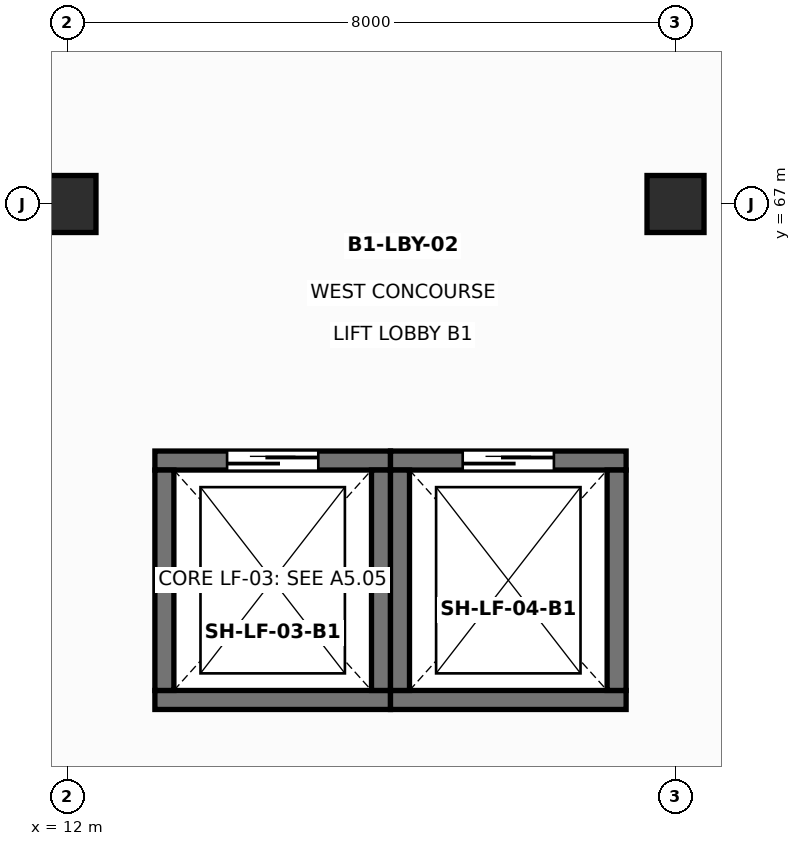
"""IFC4 building model, lengths in metres.
Left out: names, types, materials, properties, quantities, classifications, styles, units other than length and angle.
Written with IfcOpenShell. Run it as: python <this file> out.ifc"""

import sys

from ifc_helpers import new_model, si_unit, direction, frame, frame_2d, origin, origin_2d, place, context, subcontext, project, spatial, rectangle, extrude, element, fill, save


model = new_model("IFC4")
c1 = context("Model", 3, precision=1e-05, world=origin(), true_north=direction((0.0, 1.0)))
c2 = subcontext(c1, "Body", "Model", "MODEL_VIEW")
j1 = project(units=[si_unit("LENGTHUNIT", "METRE"), si_unit("PLANEANGLEUNIT", "RADIAN")], contexts=[c1])
p1 = place(None, origin())
s1 = spatial("IfcSite", under=j1, at=p1, CompositionType="ELEMENT")
p2 = place(p1, origin())
s2 = spatial("IfcBuilding", under=s1, at=p2, CompositionType="ELEMENT")
p3 = place(p2, frame((0.0, 0.0, -5.6)))
s3 = spatial("IfcBuildingStorey", under=s2, at=p3, CompositionType="ELEMENT", Elevation=-5.6)
for number, where, z_axis, x_axis in (
    (1, (12.0, 67.0, 0.0), (0.0, 0.0, 1.0), (1.0, 0.0, 0.0)),
    (2, (20.0, 67.0, 0.0), (0.0, 0.0, 1.0), (1.0, 0.0, 0.0)),
):
    element("IfcColumn", number, at=place(p3, frame(where, z_axis=z_axis, x_axis=x_axis)), inside=s3, PredefinedType="COLUMN", context=c2, shape_type="SweptSolid", body=[
        extrude(rectangle(XDim=0.75, YDim=0.75, at=origin_2d()), origin(), (0.0, 0.0, 1.0), 5.6),
    ])
p4 = place(p3, frame((13.15, 60.475, 0.0), z_axis=(0.0, 0.0, 1.0), x_axis=(1.0, 0.0, 0.0)))
e3 = element("IfcWall", 3, at=p4, inside=s3, PredefinedType="SOLIDWALL", context=c2, shape_type="SweptSolid", body=[
    extrude(rectangle(XDim=3.1, YDim=0.25, at=frame_2d((1.55, 0.0))), origin(), (0.0, 0.0, 1.0), 5.275),
])
p5 = place(p3, frame((16.25, 63.625, 0.0), z_axis=(0.0, 0.0, 1.0), x_axis=(-1.0, 0.0, 0.0)))
e4 = element("IfcWall", 4, at=p5, inside=s3, PredefinedType="SOLIDWALL", context=c2, shape_type="SweptSolid", body=[
    extrude(rectangle(XDim=3.1, YDim=0.25, at=frame_2d((1.55, 0.0))), origin(), (0.0, 0.0, 1.0), 5.275),
])
p6 = place(p5, frame((0.95, 0.0, 0.0)))
e5 = element("IfcOpeningElement", 5, at=p6, cuts=e4, PredefinedType="OPENING", context=c2, shape_type="SweptSolid", body=[
    extrude(rectangle(XDim=1.2, YDim=2.2, at=frame_2d((0.6, 1.1))), frame((0.0, 0.135, 0.0), z_axis=(0.0, -1.0, 0.0), x_axis=(1.0, 0.0, 0.0)), (0.0, 0.0, 1.0), 0.27),
])
for number, where, z_axis, x_axis in (
    (6, (16.125, 60.6, 0.0), (0.0, 0.0, 1.0), (0.0, 1.0, 0.0)),
    (7, (13.275, 63.5, 0.0), (0.0, 0.0, 1.0), (0.0, -1.0, 0.0)),
):
    element("IfcWall", number, at=place(p3, frame(where, z_axis=z_axis, x_axis=x_axis)), inside=s3, PredefinedType="SOLIDWALL", context=c2, shape_type="SweptSolid", body=[
        extrude(rectangle(XDim=2.9, YDim=0.25, at=frame_2d((1.45, 0.0))), origin(), (0.0, 0.0, 1.0), 5.275),
    ])
p7 = place(p3, frame((16.25, 60.475, 0.0), z_axis=(0.0, 0.0, 1.0), x_axis=(1.0, 0.0, 0.0)))
e8 = element("IfcWall", 8, at=p7, inside=s3, PredefinedType="SOLIDWALL", context=c2, shape_type="SweptSolid", body=[
    extrude(rectangle(XDim=3.1, YDim=0.25, at=frame_2d((1.55, 0.0))), origin(), (0.0, 0.0, 1.0), 5.275),
])
p8 = place(p3, frame((19.35, 63.625, 0.0), z_axis=(0.0, 0.0, 1.0), x_axis=(-1.0, 0.0, 0.0)))
e9 = element("IfcWall", 9, at=p8, inside=s3, PredefinedType="SOLIDWALL", context=c2, shape_type="SweptSolid", body=[
    extrude(rectangle(XDim=3.1, YDim=0.25, at=frame_2d((1.55, 0.0))), origin(), (0.0, 0.0, 1.0), 5.275),
])
p9 = place(p8, frame((0.95, 0.0, 0.0)))
e10 = element("IfcOpeningElement", 10, at=p9, cuts=e9, PredefinedType="OPENING", context=c2, shape_type="SweptSolid", body=[
    extrude(rectangle(XDim=1.2, YDim=2.2, at=frame_2d((0.6, 1.1))), frame((0.0, 0.135, 0.0), z_axis=(0.0, -1.0, 0.0), x_axis=(1.0, 0.0, 0.0)), (0.0, 0.0, 1.0), 0.27),
])
for number, where, z_axis, x_axis in (
    (11, (19.225, 60.6, 0.0), (0.0, 0.0, 1.0), (0.0, 1.0, 0.0)),
    (12, (16.375, 63.5, 0.0), (0.0, 0.0, 1.0), (0.0, -1.0, 0.0)),
):
    element("IfcWall", number, at=place(p3, frame(where, z_axis=z_axis, x_axis=x_axis)), inside=s3, PredefinedType="SOLIDWALL", context=c2, shape_type="SweptSolid", body=[
        extrude(rectangle(XDim=2.9, YDim=0.25, at=frame_2d((1.45, 0.0))), origin(), (0.0, 0.0, 1.0), 5.275),
    ])
p10 = place(p6, frame((1.2, 0.0, 0.0), z_axis=(0.0, 0.0, 1.0), x_axis=(-1.0, 0.0, 0.0)))
e13 = element("IfcDoor", 13, at=p10, inside=s3, OperationType="DOUBLE_DOOR_SLIDING", PredefinedType="DOOR", context=c2, shape_type="SweptSolid", body=[
    extrude(rectangle(XDim=1.2, YDim=2.2, at=frame_2d((0.6, 1.1))), frame((0.0, 0.025, 0.0), z_axis=(0.0, -1.0, 0.0), x_axis=(1.0, 0.0, 0.0)), (0.0, 0.0, 1.0), 0.05),
])
fill(e5, e13)
p11 = place(p9, frame((1.2, 0.0, 0.0), z_axis=(0.0, 0.0, 1.0), x_axis=(-1.0, 0.0, 0.0)))
e14 = element("IfcDoor", 14, at=p11, inside=s3, OperationType="DOUBLE_DOOR_SLIDING", PredefinedType="DOOR", context=c2, shape_type="SweptSolid", body=[
    extrude(rectangle(XDim=1.2, YDim=2.2, at=frame_2d((0.6, 1.1))), frame((0.0, 0.025, 0.0), z_axis=(0.0, -1.0, 0.0), x_axis=(1.0, 0.0, 0.0)), (0.0, 0.0, 1.0), 0.05),
])
fill(e10, e14)
save(model, sys.argv[1])
